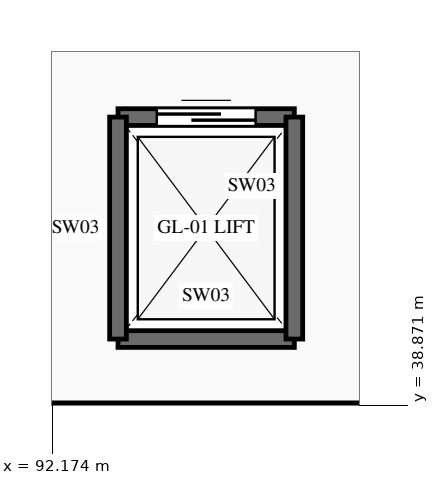
"""IFC4 building model, lengths in metres.
Left out: names, types, materials, properties, quantities, classifications, styles, units other than length and angle.
Written with IfcOpenShell. Run it as: python <this file> out.ifc"""

import sys

from ifc_helpers import new_model, si_unit, direction, frame, frame_2d, origin, place, context, subcontext, project, spatial, rectangle, extrude, element, fill, save


model = new_model("IFC4")
c1 = context("Model", 3, precision=1e-05, world=origin(), true_north=direction((0.0, 1.0)))
c2 = subcontext(c1, "Body", "Model", "MODEL_VIEW")
j1 = project(units=[si_unit("LENGTHUNIT", "METRE"), si_unit("PLANEANGLEUNIT", "RADIAN")], contexts=[c1])
p1 = place(None, origin())
s1 = spatial("IfcSite", under=j1, at=p1, CompositionType="ELEMENT")
p2 = place(p1, origin())
s2 = spatial("IfcBuilding", under=s1, at=p2, CompositionType="ELEMENT")
p3 = place(p2, frame((0.0, 0.0, 6.0)))
s3 = spatial("IfcBuildingStorey", under=s2, at=p3, CompositionType="ELEMENT", Elevation=6.0)
p4 = place(p3, frame((93.04, 39.74, 0.0), z_axis=(0.0, 0.0, 1.0), x_axis=(1.0, 0.0, 0.0)))
e1 = element("IfcWall", 1, at=p4, inside=s3, PredefinedType="SHEAR", context=c2, shape_type="SweptSolid", body=[
    extrude(rectangle(XDim=2.32, YDim=0.22, at=frame_2d((1.16, 0.0))), origin(), (0.0, 0.0, 1.0), 4.8),
])
p5 = place(p3, frame((93.04, 42.66, 0.0), z_axis=(0.0, 0.0, 1.0), x_axis=(1.0, 0.0, 0.0)))
e2 = element("IfcWall", 2, at=p5, inside=s3, PredefinedType="SHEAR", context=c2, shape_type="SweptSolid", body=[
    extrude(rectangle(XDim=2.32, YDim=0.22, at=frame_2d((1.16, 0.0))), origin(), (0.0, 0.0, 1.0), 4.8),
])
p6 = place(p5, frame((0.51, 0.0, 0.0)))
e3 = element("IfcOpeningElement", 3, at=p6, cuts=e2, PredefinedType="OPENING", context=c2, shape_type="SweptSolid", body=[
    extrude(rectangle(XDim=1.3, YDim=2.25, at=frame_2d((0.65, 1.125))), frame((0.0, 0.125, 0.0), z_axis=(0.0, -1.0, 0.0), x_axis=(1.0, 0.0, 0.0)), (0.0, 0.0, 1.0), 0.25),
])
for number, where, z_axis, x_axis in (
    (4, (93.04, 39.74, 0.0), (0.0, 0.0, 1.0), (0.0, 1.0, 0.0)),
    (5, (95.36, 39.74, 0.0), (0.0, 0.0, 1.0), (0.0, 1.0, 0.0)),
):
    element("IfcWall", number, at=place(p3, frame(where, z_axis=z_axis, x_axis=x_axis)), inside=s3, PredefinedType="SHEAR", context=c2, shape_type="SweptSolid", body=[
        extrude(rectangle(XDim=2.92, YDim=0.22, at=frame_2d((1.46, 0.0))), origin(), (0.0, 0.0, 1.0), 4.8),
    ])
p7 = place(p3, frame((84.8, 38.8, 0.0), z_axis=(0.0, 0.0, 1.0), x_axis=(1.0, 0.0, 0.0)))
e6 = element("IfcWall", 6, at=p7, inside=s3, PredefinedType="PARTITIONING", context=c2, shape_type="SweptSolid", body=[
    extrude(rectangle(XDim=31.65, YDim=0.2, at=frame_2d((15.825, 0.0))), origin(), (0.0, 0.0, 1.0), 4.17),
])
p8 = place(p7, frame((11.525, 0.0, 0.0)))
e7 = element("IfcOpeningElement", 7, at=p8, cuts=e6, PredefinedType="OPENING", context=c2, shape_type="SweptSolid", body=[
    extrude(rectangle(XDim=1.6, YDim=2.25, at=frame_2d((0.8, 1.125))), frame((0.0, 0.115, 0.0), z_axis=(0.0, -1.0, 0.0), x_axis=(1.0, 0.0, 0.0)), (0.0, 0.0, 1.0), 0.23),
])
p9 = place(p6, origin())
e8 = element("IfcDoor", 8, at=p9, inside=s3, OperationType="SLIDING_TO_RIGHT", PredefinedType="DOOR", context=c2, shape_type="SweptSolid", body=[
    extrude(rectangle(XDim=1.3, YDim=2.25, at=frame_2d((0.65, 1.125))), frame((0.0, 0.025, 0.0), z_axis=(0.0, -1.0, 0.0), x_axis=(1.0, 0.0, 0.0)), (0.0, 0.0, 1.0), 0.05),
])
fill(e3, e8)
save(model, sys.argv[1])
